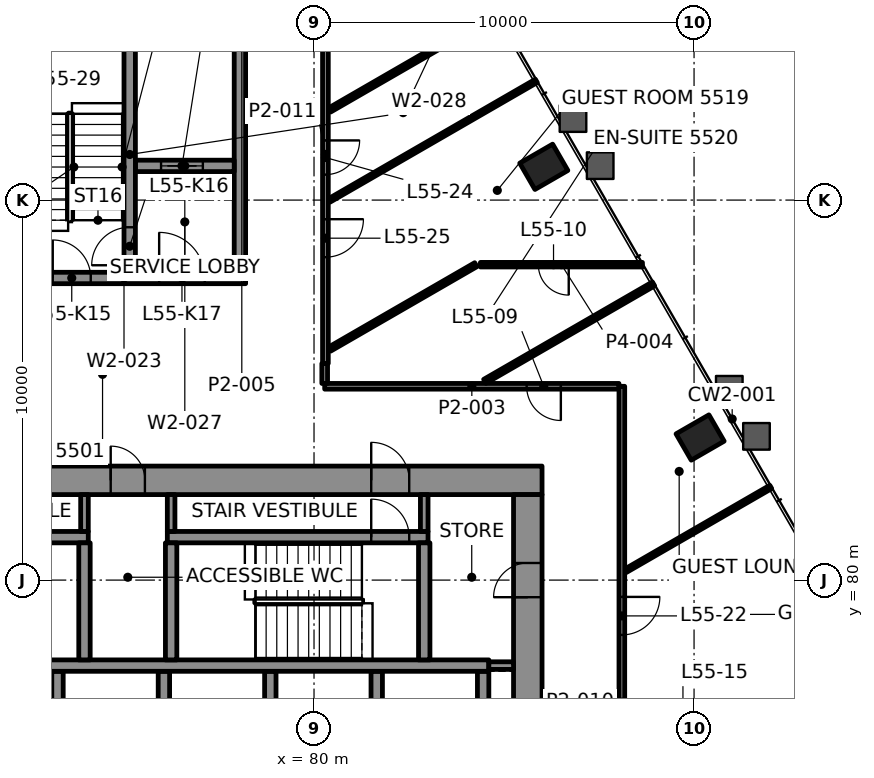
"""IFC4 building model, lengths in metres.
Left out: names, types, materials, properties, quantities, classifications, styles, units other than length and angle.
Written with IfcOpenShell. Run it as: python <this file> out.ifc"""

import sys

from ifc_helpers import new_model, si_unit, direction, frame, frame_2d, origin, origin_2d, place, context, subcontext, project, spatial, rectangle, hollow_rectangle, extrude, element, fill, save


model = new_model("IFC4")
c1 = context("Model", 3, precision=1e-05, world=origin(), true_north=direction((0.0, 1.0)))
c2 = subcontext(c1, "Body", "Model", "MODEL_VIEW")
j1 = project(units=[si_unit("LENGTHUNIT", "METRE"), si_unit("PLANEANGLEUNIT", "RADIAN")], contexts=[c1])
p1 = place(None, origin())
s1 = spatial("IfcSite", under=j1, at=p1, CompositionType="ELEMENT")
p2 = place(p1, origin())
s2 = spatial("IfcBuilding", under=s1, at=p2, CompositionType="ELEMENT")
p3 = place(p2, frame((0.0, 0.0, 233.8)))
s3 = spatial("IfcBuildingStorey", under=s2, at=p3, CompositionType="ELEMENT", Elevation=233.8)
for number, where, z_axis, x_axis in (
    (1, (90.159, 83.752, -0.0), (0.0, 0.0, 1.0), (-0.5, 0.866, 0.0)),
    (2, (86.046, 90.875, -0.0), (0.0, 0.0, 1.0), (-0.5, 0.866, 0.0)),
):
    element("IfcColumn", number, at=place(p3, frame(where, z_axis=z_axis, x_axis=x_axis)), inside=s3, PredefinedType="COLUMN", context=c2, shape_type="SweptSolid", body=[
        extrude(hollow_rectangle(XDim=0.8, YDim=1.0, WallThickness=0.05, at=origin_2d()), origin(), (0.0, 0.0, 1.0), 3.9),
    ])
p4 = place(p3, frame((64.0, 82.625, 0.0), z_axis=(0.0, 0.0, 1.0), x_axis=(1.0, 0.0, 0.0)))
e3 = element("IfcWall", 3, at=p4, inside=s3, PredefinedType="SHEAR", context=c2, shape_type="SweptSolid", body=[
    extrude(rectangle(XDim=22.0, YDim=0.75, at=frame_2d((11.0, 0.0))), origin(), (0.0, 0.0, 1.0), 3.7),
])
p5 = place(p4, frame((3.695, 0.0, 0.0)))
e4 = element("IfcOpeningElement", 4, at=p5, cuts=e3, PredefinedType="OPENING", context=c2, shape_type="SweptSolid", body=[
    extrude(rectangle(XDim=1.0, YDim=2.1, at=frame_2d((0.5, 1.05))), frame((0.0, 0.385, 0.0), z_axis=(0.0, -1.0, 0.0), x_axis=(1.0, 0.0, 0.0)), (0.0, 0.0, 1.0), 0.77),
])
p6 = place(p4, frame((17.505, 0.0, 0.0)))
e5 = element("IfcOpeningElement", 5, at=p6, cuts=e3, PredefinedType="OPENING", context=c2, shape_type="SweptSolid", body=[
    extrude(rectangle(XDim=1.0, YDim=2.1, at=frame_2d((0.5, 1.05))), frame((0.0, 0.385, 0.0), z_axis=(0.0, -1.0, 0.0), x_axis=(1.0, 0.0, 0.0)), (0.0, 0.0, 1.0), 0.77),
])
p7 = place(p4, frame((10.65, 0.0, 0.0)))
e6 = element("IfcOpeningElement", 6, at=p7, cuts=e3, PredefinedType="OPENING", context=c2, shape_type="SweptSolid", body=[
    extrude(rectangle(XDim=0.9, YDim=2.1, at=frame_2d((0.45, 1.05))), frame((0.0, 0.385, 0.0), z_axis=(0.0, -1.0, 0.0), x_axis=(1.0, 0.0, 0.0)), (0.0, 0.0, 1.0), 0.77),
])
p8 = place(p3, frame((85.625, 67.75, 0.0), z_axis=(0.0, 0.0, 1.0), x_axis=(0.0, 1.0, 0.0)))
e7 = element("IfcWall", 7, at=p8, inside=s3, PredefinedType="SHEAR", context=c2, shape_type="SweptSolid", body=[
    extrude(rectangle(XDim=14.5, YDim=0.75, at=frame_2d((7.25, 0.0))), origin(), (0.0, 0.0, 1.0), 3.7),
])
p9 = place(p8, frame((4.65, 0.0, 0.0)))
e8 = element("IfcOpeningElement", 8, at=p9, cuts=e7, PredefinedType="OPENING", context=c2, shape_type="SweptSolid", body=[
    extrude(rectangle(XDim=1.8, YDim=2.1, at=frame_2d((0.9, 1.05))), frame((0.0, 0.385, 0.0), z_axis=(0.0, -1.0, 0.0), x_axis=(1.0, 0.0, 0.0)), (0.0, 0.0, 1.0), 0.77),
])
p10 = place(p8, frame((11.8, 0.0, 0.0)))
e9 = element("IfcOpeningElement", 9, at=p10, cuts=e7, PredefinedType="OPENING", context=c2, shape_type="SweptSolid", body=[
    extrude(rectangle(XDim=0.9, YDim=2.1, at=frame_2d((0.45, 1.05))), frame((0.0, 0.385, 0.0), z_axis=(0.0, -1.0, 0.0), x_axis=(1.0, 0.0, 0.0)), (0.0, 0.0, 1.0), 0.77),
])
for number, where, z_axis, x_axis in (
    (10, (73.25, 75.0, 0.0), (0.0, 0.0, 1.0), (0.0, 1.0, 0.0)),
    (11, (76.05, 75.0, 0.0), (0.0, 0.0, 1.0), (0.0, 1.0, 0.0)),
    (12, (78.85, 75.0, 0.0), (0.0, 0.0, 1.0), (0.0, 1.0, 0.0)),
    (13, (81.65, 75.0, 0.0), (0.0, 0.0, 1.0), (0.0, 1.0, 0.0)),
    (14, (84.45, 75.0, 0.0), (0.0, 0.0, 1.0), (0.0, 1.0, 0.0)),
):
    element("IfcWall", number, at=place(p3, frame(where, z_axis=z_axis, x_axis=x_axis)), inside=s3, PredefinedType="SHEAR", context=c2, shape_type="SweptSolid", body=[
        extrude(rectangle(XDim=2.6, YDim=0.3, at=frame_2d((1.3, 0.0))), origin(), (0.0, 0.0, 1.0), 3.7),
    ])
p11 = place(p3, frame((67.15, 77.75, 0.0), z_axis=(0.0, 0.0, 1.0), x_axis=(1.0, 0.0, 0.0)))
e15 = element("IfcWall", 15, at=p11, inside=s3, PredefinedType="SHEAR", context=c2, shape_type="SweptSolid", body=[
    extrude(rectangle(XDim=17.45, YDim=0.3, at=frame_2d((8.725, 0.0))), origin(), (0.0, 0.0, 1.0), 3.7),
])
p12 = place(p11, frame((0.545, 0.0, 0.0)))
e16 = element("IfcOpeningElement", 16, at=p12, cuts=e15, PredefinedType="OPENING", context=c2, shape_type="SweptSolid", body=[
    extrude(rectangle(XDim=1.0, YDim=2.1, at=frame_2d((0.5, 1.05))), frame((0.0, 0.16, 0.0), z_axis=(0.0, -1.0, 0.0), x_axis=(1.0, 0.0, 0.0)), (0.0, 0.0, 1.0), 0.32),
])
p13 = place(p3, frame((67.15, 81.13, 0.0), z_axis=(0.0, 0.0, 1.0), x_axis=(1.0, 0.0, 0.0)))
e17 = element("IfcWall", 17, at=p13, inside=s3, PredefinedType="SHEAR", context=c2, shape_type="SweptSolid", body=[
    extrude(rectangle(XDim=6.91, YDim=0.3, at=frame_2d((3.455, 0.0))), origin(), (0.0, 0.0, 1.0), 3.7),
])
p14 = place(p13, frame((0.545, 0.0, 0.0)))
e18 = element("IfcOpeningElement", 18, at=p14, cuts=e17, PredefinedType="OPENING", context=c2, shape_type="SweptSolid", body=[
    extrude(rectangle(XDim=1.0, YDim=2.1, at=frame_2d((0.5, 1.05))), frame((0.0, 0.16, 0.0), z_axis=(0.0, -1.0, 0.0), x_axis=(1.0, 0.0, 0.0)), (0.0, 0.0, 1.0), 0.32),
])
p15 = place(p3, frame((76.14, 81.13, 0.0), z_axis=(0.0, 0.0, 1.0), x_axis=(1.0, 0.0, 0.0)))
e19 = element("IfcWall", 19, at=p15, inside=s3, PredefinedType="SHEAR", context=c2, shape_type="SweptSolid", body=[
    extrude(rectangle(XDim=6.86, YDim=0.3, at=frame_2d((3.43, 0.0))), origin(), (0.0, 0.0, 1.0), 3.7),
])
p16 = place(p15, frame((5.365, 0.0, 0.0)))
e20 = element("IfcOpeningElement", 20, at=p16, cuts=e19, PredefinedType="OPENING", context=c2, shape_type="SweptSolid", body=[
    extrude(rectangle(XDim=1.0, YDim=2.1, at=frame_2d((0.5, 1.05))), frame((0.0, 0.16, 0.0), z_axis=(0.0, -1.0, 0.0), x_axis=(1.0, 0.0, 0.0)), (0.0, 0.0, 1.0), 0.32),
])
for number, where, z_axis, x_axis in (
    (21, (73.96, 77.9, 0.0), (0.0, 0.0, 1.0), (0.0, 1.0, 0.0)),
    (22, (76.24, 77.9, 0.0), (0.0, 0.0, 1.0), (0.0, 1.0, 0.0)),
    (23, (82.9, 77.9, 0.0), (0.0, 0.0, 1.0), (0.0, 1.0, 0.0)),
):
    element("IfcWall", number, at=place(p3, frame(where, z_axis=z_axis, x_axis=x_axis)), inside=s3, PredefinedType="SHEAR", context=c2, shape_type="SweptSolid", body=[
        extrude(rectangle(XDim=3.08, YDim=0.3, at=frame_2d((1.54, 0.0))), origin(), (0.0, 0.0, 1.0), 3.7),
    ])
p17 = place(p3, frame((71.8, 87.95, 0.0), z_axis=(0.0, 0.0, 1.0), x_axis=(1.0, 0.0, 0.0)))
e24 = element("IfcWall", 24, at=p17, inside=s3, PredefinedType="SHEAR", context=c2, shape_type="SweptSolid", body=[
    extrude(rectangle(XDim=6.4, YDim=0.3, at=frame_2d((3.2, 0.0))), origin(), (0.0, 0.0, 1.0), 3.7),
])
p18 = place(p17, frame((1.325, 0.0, 0.0)))
e25 = element("IfcOpeningElement", 25, at=p18, cuts=e24, PredefinedType="OPENING", context=c2, shape_type="SweptSolid", body=[
    extrude(rectangle(XDim=1.0, YDim=2.1, at=frame_2d((0.5, 1.05))), frame((0.0, 0.16, 0.0), z_axis=(0.0, -1.0, 0.0), x_axis=(1.0, 0.0, 0.0)), (0.0, 0.0, 1.0), 0.32),
])
p19 = place(p17, frame((4.125, 0.0, 0.0)))
e26 = element("IfcOpeningElement", 26, at=p19, cuts=e24, PredefinedType="OPENING", context=c2, shape_type="SweptSolid", body=[
    extrude(rectangle(XDim=1.2, YDim=2.1, at=frame_2d((0.6, 1.05))), frame((0.0, 0.16, 0.0), z_axis=(0.0, -1.0, 0.0), x_axis=(1.0, 0.0, 0.0)), (0.0, 0.0, 1.0), 0.32),
])
p20 = place(p3, frame((78.05, 88.1, 0.0), z_axis=(0.0, 0.0, 1.0), x_axis=(0.0, 1.0, 0.0)))
e27 = element("IfcWall", 27, at=p20, inside=s3, PredefinedType="SHEAR", context=c2, shape_type="SweptSolid", body=[
    extrude(rectangle(XDim=6.2, YDim=0.3, at=frame_2d((3.1, 0.0))), origin(), (0.0, 0.0, 1.0), 3.7),
])
p21 = place(p3, frame((75.3, 90.9, 0.0), z_axis=(0.0, 0.0, 1.0), x_axis=(1.0, 0.0, 0.0)))
e28 = element("IfcWall", 28, at=p21, inside=s3, PredefinedType="SHEAR", context=c2, shape_type="SweptSolid", body=[
    extrude(rectangle(XDim=2.6, YDim=0.3, at=frame_2d((1.3, 0.0))), origin(), (0.0, 0.0, 1.0), 3.7),
])
p22 = place(p21, frame((0.675, 0.0, 0.0)))
e29 = element("IfcOpeningElement", 29, at=p22, cuts=e28, PredefinedType="OPENING", context=c2, shape_type="SweptSolid", body=[
    extrude(rectangle(XDim=1.1, YDim=2.1, at=frame_2d((0.55, 1.05))), frame((0.0, 0.16, 0.0), z_axis=(0.0, -1.0, 0.0), x_axis=(1.0, 0.0, 0.0)), (0.0, 0.0, 1.0), 0.32),
])
p23 = place(p3, frame((75.15, 88.1, 0.0), z_axis=(0.0, 0.0, 1.0), x_axis=(0.0, 1.0, 0.0)))
e30 = element("IfcWall", 30, at=p23, inside=s3, PredefinedType="SHEAR", context=c2, shape_type="SweptSolid", body=[
    extrude(rectangle(XDim=6.2, YDim=0.3, at=frame_2d((3.1, 0.0))), origin(), (0.0, 0.0, 1.0), 3.7),
])
p24 = place(p23, frame((0.185, 0.0, 0.0)))
e31 = element("IfcOpeningElement", 31, at=p24, cuts=e30, PredefinedType="OPENING", context=c2, shape_type="SweptSolid", body=[
    extrude(rectangle(XDim=1.0, YDim=2.1, at=frame_2d((0.5, 1.05))), frame((0.0, 0.16, 0.0), z_axis=(0.0, -1.0, 0.0), x_axis=(1.0, 0.0, 0.0)), (0.0, 0.0, 1.0), 0.32),
])
p25 = place(p3, frame((88.024, 85.1, 0.0), z_axis=(0.0, 0.0, 1.0), x_axis=(-1.0, 0.0, 0.0)))
e32 = element("IfcWall", 32, at=p25, inside=s3, PredefinedType="PARTITIONING", context=c2, shape_type="SweptSolid", body=[
    extrude(rectangle(XDim=7.744, YDim=0.15, at=frame_2d((3.872, 0.0))), origin(), (0.0, 0.0, 1.0), 3.1),
])
p26 = place(p25, frame((1.53, 0.0, 0.0)))
e33 = element("IfcOpeningElement", 33, at=p26, cuts=e32, PredefinedType="OPENING", context=c2, shape_type="SweptSolid", body=[
    extrude(rectangle(XDim=0.9, YDim=2.1, at=frame_2d((0.45, 1.05))), frame((0.0, 0.085, 0.0), z_axis=(0.0, -1.0, 0.0), x_axis=(1.0, 0.0, 0.0)), (0.0, 0.0, 1.0), 0.17),
])
p27 = place(p3, frame((88.642, 88.3, 0.0), z_axis=(0.0, 0.0, 1.0), x_axis=(-1.0, 0.0, 0.0)))
e34 = element("IfcWall", 34, at=p27, inside=s3, PredefinedType="PARTITIONING", context=c2, shape_type="SweptSolid", body=[
    extrude(rectangle(XDim=4.263, YDim=0.12, at=frame_2d((2.132, 0.0))), origin(), (0.0, 0.0, 1.0), 3.022),
])
p28 = place(p27, frame((1.939, 0.0, 0.0)))
e35 = element("IfcOpeningElement", 35, at=p28, cuts=e34, PredefinedType="OPENING", context=c2, shape_type="SweptSolid", body=[
    extrude(rectangle(XDim=0.8, YDim=2.1, at=frame_2d((0.4, 1.05))), frame((0.0, 0.07, 0.0), z_axis=(0.0, -1.0, 0.0), x_axis=(1.0, 0.0, 0.0)), (0.0, 0.0, 1.0), 0.14),
])
p29 = place(p3, frame((88.201, 80.248, 0.0), z_axis=(0.0, 0.0, 1.0), x_axis=(0.866050012359, 0.499957374277, 0.0)))
e36 = element("IfcWall", 36, at=p29, inside=s3, PredefinedType="PARTITIONING", context=c2, shape_type="SweptSolid", body=[
    extrude(rectangle(XDim=4.408, YDim=0.1, at=frame_2d((2.204, 0.0))), origin(), (0.0, 0.0, 1.0), 3.022),
])
p30 = place(p3, frame((84.493, 85.23, 0.0), z_axis=(0.0, 0.0, 1.0), x_axis=(0.866034146242, 0.499984857314, 0.0)))
e37 = element("IfcWall", 37, at=p30, inside=s3, PredefinedType="PARTITIONING", context=c2, shape_type="SweptSolid", body=[
    extrude(rectangle(XDim=5.128, YDim=0.12, at=frame_2d((2.564, 0.0))), origin(), (0.0, 0.0, 1.0), 3.022),
])
p31 = place(p3, frame((80.41, 86.078, 0.0), z_axis=(0.0, 0.0, 1.0), x_axis=(0.866033721197, 0.499985593543, 0.0)))
e38 = element("IfcWall", 38, at=p31, inside=s3, PredefinedType="PARTITIONING", context=c2, shape_type="SweptSolid", body=[
    extrude(rectangle(XDim=4.444, YDim=0.12, at=frame_2d((2.222, 0.0))), origin(), (0.0, 0.0, 1.0), 3.1),
])
p32 = place(p3, frame((80.401, 89.991, 0.0), z_axis=(0.0, 0.0, 1.0), x_axis=(0.86602790099, 0.499995674689, 0.0)))
e39 = element("IfcWall", 39, at=p32, inside=s3, PredefinedType="PARTITIONING", context=c2, shape_type="SweptSolid", body=[
    extrude(rectangle(XDim=6.291, YDim=0.1, at=frame_2d((3.146, 0.0))), origin(), (0.0, 0.0, 1.0), 3.022),
])
p33 = place(p3, frame((80.41, 92.37, 0.0), z_axis=(0.0, 0.0, 1.0), x_axis=(0.866028357664, 0.499994883695, 0.0)))
e40 = element("IfcWall", 40, at=p33, inside=s3, PredefinedType="PARTITIONING", context=c2, shape_type="SweptSolid", body=[
    extrude(rectangle(XDim=3.568, YDim=0.12, at=frame_2d((1.784, 0.0))), origin(), (0.0, 0.0, 1.0), 3.1),
])
p34 = place(p3, frame((88.1, 85.1, 0.0), z_axis=(0.0, 0.0, 1.0), x_axis=(0.0, -1.0, 0.0)))
e41 = element("IfcWall", 41, at=p34, inside=s3, PredefinedType="PARTITIONING", context=c2, shape_type="SweptSolid", body=[
    extrude(rectangle(XDim=16.624, YDim=0.15, at=frame_2d((8.312, 0.0))), origin(), (0.0, 0.0, 1.0), 3.1),
])
p35 = place(p34, frame((5.542, 0.0, 0.0)))
e42 = element("IfcOpeningElement", 42, at=p35, cuts=e41, PredefinedType="OPENING", context=c2, shape_type="SweptSolid", body=[
    extrude(rectangle(XDim=1.0, YDim=2.1, at=frame_2d((0.5, 1.05))), frame((0.0, 0.085, 0.0), z_axis=(0.0, -1.0, 0.0), x_axis=(1.0, 0.0, 0.0)), (0.0, 0.0, 1.0), 0.17),
])
p36 = place(p34, frame((14.558, 0.0, 0.0)))
e43 = element("IfcOpeningElement", 43, at=p36, cuts=e41, PredefinedType="OPENING", context=c2, shape_type="SweptSolid", body=[
    extrude(rectangle(XDim=1.0, YDim=2.1, at=frame_2d((0.5, 1.05))), frame((0.0, 0.085, 0.0), z_axis=(0.0, -1.0, 0.0), x_axis=(1.0, 0.0, 0.0)), (0.0, 0.0, 1.0), 0.17),
])
p37 = place(p3, frame((80.3, 96.699, 0.0), z_axis=(0.0, 0.0, 1.0), x_axis=(0.0, -1.0, 0.0)))
e44 = element("IfcWall", 44, at=p37, inside=s3, PredefinedType="PARTITIONING", context=c2, shape_type="SweptSolid", body=[
    extrude(rectangle(XDim=10.999, YDim=0.15, at=frame_2d((5.5, 0.0))), origin(), (0.0, 0.0, 1.0), 3.1),
])
p38 = place(p37, frame((5.129, 0.0, 0.0)))
e45 = element("IfcOpeningElement", 45, at=p38, cuts=e44, PredefinedType="OPENING", context=c2, shape_type="SweptSolid", body=[
    extrude(rectangle(XDim=0.9, YDim=2.1, at=frame_2d((0.45, 1.05))), frame((0.0, 0.085, 0.0), z_axis=(0.0, -1.0, 0.0), x_axis=(1.0, 0.0, 0.0)), (0.0, 0.0, 1.0), 0.17),
])
p39 = place(p37, frame((7.202, 0.0, 0.0)))
e46 = element("IfcOpeningElement", 46, at=p39, cuts=e44, PredefinedType="OPENING", context=c2, shape_type="SweptSolid", body=[
    extrude(rectangle(XDim=1.0, YDim=2.1, at=frame_2d((0.5, 1.05))), frame((0.0, 0.085, 0.0), z_axis=(0.0, -1.0, 0.0), x_axis=(1.0, 0.0, 0.0)), (0.0, 0.0, 1.0), 0.17),
])
p40 = place(p3, frame((80.281, 85.175, 0.0), z_axis=(0.0, 0.0, 1.0), x_axis=(0.0, 1.0, 0.0)))
e47 = element("IfcWall", 47, at=p40, inside=s3, PredefinedType="PARTITIONING", context=c2, shape_type="SweptSolid", body=[
    extrude(rectangle(XDim=0.525, YDim=0.15, at=frame_2d((0.262, 0.0))), origin(), (0.0, 0.0, 1.0), 3.1),
])
p41 = place(p3, frame((84.6, 77.75, 0.0), z_axis=(0.0, 0.0, 1.0), x_axis=(1.0, 0.0, 0.0)))
e48 = element("IfcWall", 48, at=p41, inside=s3, PredefinedType="PARTITIONING", context=c2, shape_type="SweptSolid", body=[
    extrude(rectangle(XDim=0.65, YDim=0.2, at=frame_2d((0.325, 0.0))), origin(), (0.0, 0.0, 1.0), 3.7),
])
for number, where, z_axis, x_axis in (
    (49, (73.96, 81.28, 0.0), (0.0, 0.0, 1.0), (0.0, 1.0, 0.0)),
    (50, (76.24, 81.28, 0.0), (0.0, 0.0, 1.0), (0.0, 1.0, 0.0)),
    (51, (82.9, 81.28, 0.0), (0.0, 0.0, 1.0), (0.0, 1.0, 0.0)),
):
    element("IfcWall", number, at=place(p3, frame(where, z_axis=z_axis, x_axis=x_axis)), inside=s3, PredefinedType="PARTITIONING", context=c2, shape_type="SweptSolid", body=[
        extrude(rectangle(XDim=0.97, YDim=0.2, at=frame_2d((0.485, 0.0))), origin(), (0.0, 0.0, 1.0), 3.7),
    ])
p42 = place(p26, origin())
e52 = element("IfcDoor", 52, at=p42, inside=s3, OperationType="SINGLE_SWING_RIGHT", PredefinedType="DOOR", context=c2, shape_type="SweptSolid", body=[
    extrude(rectangle(XDim=0.9, YDim=2.1, at=frame_2d((0.45, 1.05))), frame((0.0, 0.025, 0.0), z_axis=(0.0, -1.0, 0.0), x_axis=(1.0, 0.0, 0.0)), (0.0, 0.0, 1.0), 0.05),
])
fill(e33, e52)
p43 = place(p28, origin())
e53 = element("IfcDoor", 53, at=p43, inside=s3, OperationType="SINGLE_SWING_RIGHT", PredefinedType="DOOR", context=c2, shape_type="SweptSolid", body=[
    extrude(rectangle(XDim=0.8, YDim=2.1, at=frame_2d((0.4, 1.05))), frame((0.0, 0.025, 0.0), z_axis=(0.0, -1.0, 0.0), x_axis=(1.0, 0.0, 0.0)), (0.0, 0.0, 1.0), 0.05),
])
fill(e35, e53)
p44 = place(p35, origin())
e54 = element("IfcDoor", 54, at=p44, inside=s3, OperationType="SINGLE_SWING_RIGHT", PredefinedType="DOOR", context=c2, shape_type="SweptSolid", body=[
    extrude(rectangle(XDim=1.0, YDim=2.1, at=frame_2d((0.5, 1.05))), frame((0.0, 0.025, 0.0), z_axis=(0.0, -1.0, 0.0), x_axis=(1.0, 0.0, 0.0)), (0.0, 0.0, 1.0), 0.05),
])
fill(e42, e54)
p45 = place(p38, origin())
e55 = element("IfcDoor", 55, at=p45, inside=s3, OperationType="SINGLE_SWING_LEFT", PredefinedType="DOOR", context=c2, shape_type="SweptSolid", body=[
    extrude(rectangle(XDim=0.9, YDim=2.1, at=frame_2d((0.45, 1.05))), frame((0.0, 0.025, 0.0), z_axis=(0.0, -1.0, 0.0), x_axis=(1.0, 0.0, 0.0)), (0.0, 0.0, 1.0), 0.05),
])
fill(e45, e55)
p46 = place(p39, origin())
e56 = element("IfcDoor", 56, at=p46, inside=s3, OperationType="SINGLE_SWING_LEFT", PredefinedType="DOOR", context=c2, shape_type="SweptSolid", body=[
    extrude(rectangle(XDim=1.0, YDim=2.1, at=frame_2d((0.5, 1.05))), frame((0.0, 0.025, 0.0), z_axis=(0.0, -1.0, 0.0), x_axis=(1.0, 0.0, 0.0)), (0.0, 0.0, 1.0), 0.05),
])
fill(e46, e56)
p47 = place(p3, origin())
p48 = place(p47, frame((85.49, 93.789, 0.15), z_axis=(0.0, 0.0, 1.0), x_axis=(-0.5, 0.866025, 0.0)))
p49 = place(p48, origin())
e57 = element("IfcWindow", 57, at=p49, inside=s3, PartitioningType="SINGLE_PANEL", PredefinedType="WINDOW", context=c2, shape_type="SweptSolid", body=[
    extrude(rectangle(XDim=2.667, YDim=3.55, at=frame_2d((1.333, 1.775))), frame((0.0, 0.03, 0.0), z_axis=(0.0, -1.0, 0.0), x_axis=(1.0, 0.0, 0.0)), (0.0, 0.0, 1.0), 0.06),
])
p50 = place(p22, origin())
e58 = element("IfcDoor", 58, at=p50, inside=s3, OperationType="DOUBLE_DOOR_SLIDING", PredefinedType="DOOR", context=c2, shape_type="SweptSolid", body=[
    extrude(rectangle(XDim=1.1, YDim=2.1, at=frame_2d((0.55, 1.05))), frame((0.0, 0.025, 0.0), z_axis=(0.0, -1.0, 0.0), x_axis=(1.0, 0.0, 0.0)), (0.0, 0.0, 1.0), 0.05),
])
fill(e29, e58)
p51 = place(p16, origin())
e59 = element("IfcDoor", 59, at=p51, inside=s3, OperationType="SINGLE_SWING_RIGHT", PredefinedType="DOOR", context=c2, shape_type="SweptSolid", body=[
    extrude(rectangle(XDim=1.0, YDim=2.1, at=frame_2d((0.5, 1.05))), frame((0.0, 0.025, 0.0), z_axis=(0.0, -1.0, 0.0), x_axis=(1.0, 0.0, 0.0)), (0.0, 0.0, 1.0), 0.05),
])
fill(e20, e59)
p52 = place(p6, origin())
e60 = element("IfcDoor", 60, at=p52, inside=s3, OperationType="SINGLE_SWING_LEFT", PredefinedType="DOOR", context=c2, shape_type="SweptSolid", body=[
    extrude(rectangle(XDim=1.0, YDim=2.1, at=frame_2d((0.5, 1.05))), frame((0.0, 0.095, 0.0), z_axis=(0.0, -1.0, 0.0), x_axis=(1.0, 0.0, 0.0)), (0.0, 0.0, 1.0), 0.19),
])
fill(e5, e60)
p53 = place(p18, origin())
e61 = element("IfcDoor", 61, at=p53, inside=s3, OperationType="SINGLE_SWING_RIGHT", PredefinedType="DOOR", context=c2, shape_type="SweptSolid", body=[
    extrude(rectangle(XDim=1.0, YDim=2.1, at=frame_2d((0.5, 1.05))), frame((0.0, 0.025, 0.0), z_axis=(0.0, -1.0, 0.0), x_axis=(1.0, 0.0, 0.0)), (0.0, 0.0, 1.0), 0.05),
])
fill(e25, e61)
p54 = place(p24, origin())
e62 = element("IfcDoor", 62, at=p54, inside=s3, OperationType="SINGLE_SWING_LEFT", PredefinedType="DOOR", context=c2, shape_type="SweptSolid", body=[
    extrude(rectangle(XDim=1.0, YDim=2.1, at=frame_2d((0.5, 1.05))), frame((0.0, 0.025, 0.0), z_axis=(0.0, -1.0, 0.0), x_axis=(1.0, 0.0, 0.0)), (0.0, 0.0, 1.0), 0.05),
])
fill(e31, e62)
p55 = place(p19, origin())
e63 = element("IfcDoor", 63, at=p55, inside=s3, OperationType="SINGLE_SWING_RIGHT", PredefinedType="DOOR", context=c2, shape_type="SweptSolid", body=[
    extrude(rectangle(XDim=1.2, YDim=2.1, at=frame_2d((0.6, 1.05))), frame((0.0, 0.025, 0.0), z_axis=(0.0, -1.0, 0.0), x_axis=(1.0, 0.0, 0.0)), (0.0, 0.0, 1.0), 0.05),
])
fill(e26, e63)
p56 = place(p7, origin())
e64 = element("IfcDoor", 64, at=p56, inside=s3, OperationType="SINGLE_SWING_LEFT", PredefinedType="DOOR", context=c2, shape_type="SweptSolid", body=[
    extrude(rectangle(XDim=0.9, YDim=2.1, at=frame_2d((0.45, 1.05))), frame((0.0, 0.095, 0.0), z_axis=(0.0, -1.0, 0.0), x_axis=(1.0, 0.0, 0.0)), (0.0, 0.0, 1.0), 0.19),
])
fill(e6, e64)
p57 = place(p10, origin())
e65 = element("IfcDoor", 65, at=p57, inside=s3, OperationType="SINGLE_SWING_RIGHT", PredefinedType="DOOR", context=c2, shape_type="SweptSolid", body=[
    extrude(rectangle(XDim=0.9, YDim=2.1, at=frame_2d((0.45, 1.05))), frame((0.0, 0.095, 0.0), z_axis=(0.0, -1.0, 0.0), x_axis=(1.0, 0.0, 0.0)), (0.0, 0.0, 1.0), 0.19),
])
fill(e9, e65)
save(model, sys.argv[1])
